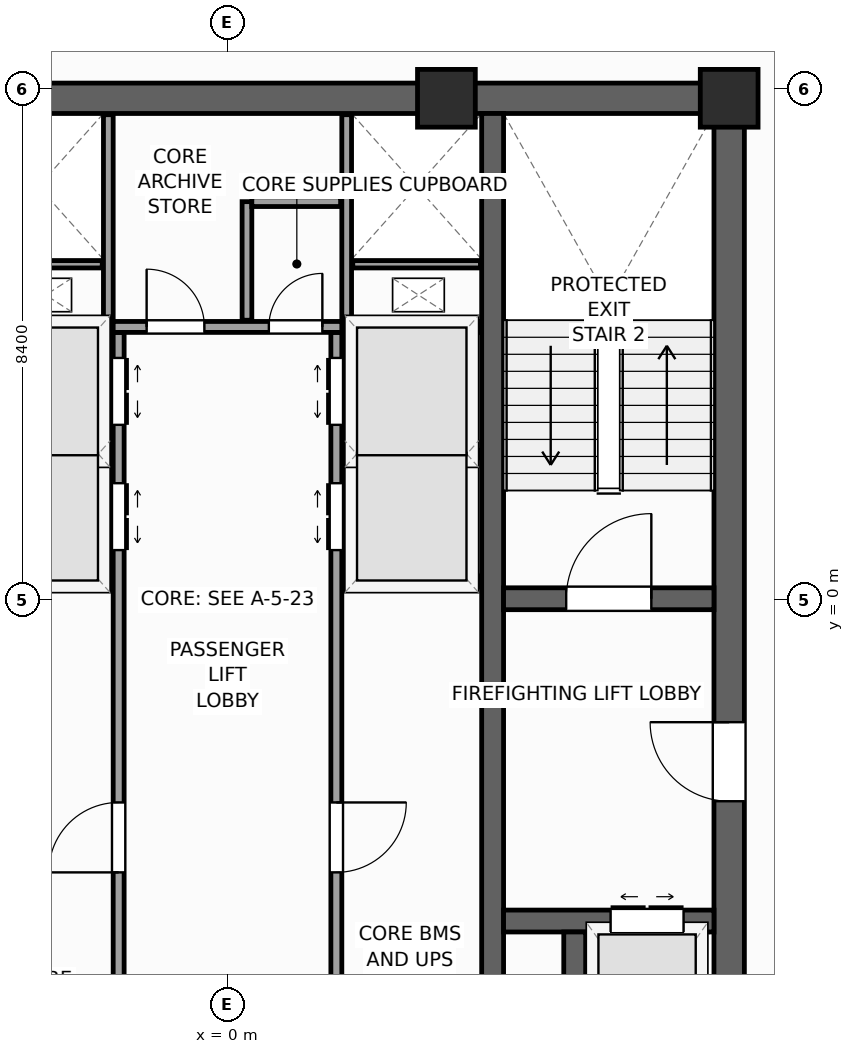
"""IFC4 building model, lengths in metres.
Left out: names, types, materials, properties, quantities, classifications, styles, units other than length and angle.
Written with IfcOpenShell. Run it as: python <this file> out.ifc"""

import sys

from ifc_helpers import new_model, si_unit, direction, frame, frame_2d, origin, origin_2d, place, context, subcontext, project, spatial, rectangle, extrude, source, transform, mapped, element, fill, save


model = new_model("IFC4")
c1 = context("Model", 3, precision=1e-05, world=origin(), true_north=direction((0.0, 1.0)))
c2 = subcontext(c1, "Body", "Model", "MODEL_VIEW")
j1 = project(units=[si_unit("LENGTHUNIT", "METRE"), si_unit("PLANEANGLEUNIT", "RADIAN")], contexts=[c1])
p1 = place(None, origin())
s1 = spatial("IfcSite", under=j1, at=p1, CompositionType="ELEMENT")
p2 = place(p1, origin())
s2 = spatial("IfcBuilding", under=s1, at=p2, CompositionType="ELEMENT")
p3 = place(p2, frame((0.0, 0.0, 248.5)))
s3 = spatial("IfcBuildingStorey", under=s2, at=p3, CompositionType="ELEMENT", Elevation=248.5)
p4 = place(p3, frame((-8.5, 8.25, 0.0), z_axis=(0.0, 0.0, 1.0), x_axis=(1.0, 0.0, 0.0)))
e1 = element("IfcWall", 1, at=p4, inside=s3, PredefinedType="SHEAR", context=c2, shape_type="SweptSolid", body=[
    extrude(rectangle(XDim=17.0, YDim=0.5, at=frame_2d((8.5, 0.0))), origin(), (0.0, 0.0, 1.0), 3.9),
])
p5 = place(p3, frame((8.25, -8.0, 0.0), z_axis=(0.0, 0.0, 1.0), x_axis=(0.0, 1.0, 0.0)))
e2 = element("IfcWall", 2, at=p5, inside=s3, PredefinedType="SHEAR", context=c2, shape_type="SweptSolid", body=[
    extrude(rectangle(XDim=16.0, YDim=0.5, at=frame_2d((8.0, 0.0))), origin(), (0.0, 0.0, 1.0), 3.9),
])
p6 = place(p5, frame((4.69, 0.0, 0.0)))
e3 = element("IfcOpeningElement", 3, at=p6, cuts=e2, PredefinedType="OPENING", context=c2, shape_type="SweptSolid", body=[
    extrude(rectangle(XDim=1.3, YDim=2.2, at=frame_2d((0.65, 1.1))), frame((0.0, 0.26, 0.0), z_axis=(0.0, -1.0, 0.0), x_axis=(1.0, 0.0, 0.0)), (0.0, 0.0, 1.0), 0.52),
])
p7 = place(p3, frame((4.36, -8.0, 0.0), z_axis=(0.0, 0.0, 1.0), x_axis=(0.0, 1.0, 0.0)))
e4 = element("IfcWall", 4, at=p7, inside=s3, PredefinedType="SHEAR", context=c2, shape_type="SweptSolid", body=[
    extrude(rectangle(XDim=16.0, YDim=0.36, at=frame_2d((8.0, 0.0))), origin(), (0.0, 0.0, 1.0), 3.9),
])
p8 = place(p3, frame((4.54, 0.02, 0.0), z_axis=(0.0, 0.0, 1.0), x_axis=(1.0, 0.0, 0.0)))
e5 = element("IfcWall", 5, at=p8, inside=s3, PredefinedType="SHEAR", context=c2, shape_type="SweptSolid", body=[
    extrude(rectangle(XDim=3.46, YDim=0.36, at=frame_2d((1.73, 0.0))), origin(), (0.0, 0.0, 1.0), 3.9),
])
p9 = place(p8, frame((1.03, 0.0, 0.0)))
e6 = element("IfcOpeningElement", 6, at=p9, cuts=e5, PredefinedType="OPENING", context=c2, shape_type="SweptSolid", body=[
    extrude(rectangle(XDim=1.4, YDim=2.2, at=frame_2d((0.7, 1.1))), frame((0.0, 0.19, 0.0), z_axis=(0.0, -1.0, 0.0), x_axis=(1.0, 0.0, 0.0)), (0.0, 0.0, 1.0), 0.38),
])
p10 = place(p3, frame((4.54, -5.28, 0.0), z_axis=(0.0, 0.0, 1.0), x_axis=(1.0, 0.0, 0.0)))
e7 = element("IfcWall", 7, at=p10, inside=s3, PredefinedType="SHEAR", context=c2, shape_type="SweptSolid", body=[
    extrude(rectangle(XDim=3.46, YDim=0.36, at=frame_2d((1.73, 0.0))), origin(), (0.0, 0.0, 1.0), 3.9),
])
p11 = place(p10, frame((1.76, 0.0, 0.0)))
e8 = element("IfcOpeningElement", 8, at=p11, cuts=e7, PredefinedType="OPENING", context=c2, shape_type="SweptSolid", body=[
    extrude(rectangle(XDim=1.2, YDim=2.25, at=frame_2d((0.6, 1.125))), frame((0.0, 0.19, 0.0), z_axis=(0.0, -1.0, 0.0), x_axis=(1.0, 0.0, 0.0)), (0.0, 0.0, 1.0), 0.38),
])
p12 = place(p3, frame((5.71, -8.0, 0.0), z_axis=(0.0, 0.0, 1.0), x_axis=(0.0, 1.0, 0.0)))
e9 = element("IfcWall", 9, at=p12, inside=s3, PredefinedType="SHEAR", context=c2, shape_type="SweptSolid", body=[
    extrude(rectangle(XDim=2.54, YDim=0.36, at=frame_2d((1.27, 0.0))), origin(), (0.0, 0.0, 1.0), 3.9),
])
m1 = source(origin(), c2, "Body", "SweptSolid", [
    extrude(rectangle(XDim=0.95, YDim=0.95, at=origin_2d()), origin(), (0.0, 0.0, 1.0), 3.9),
])
for number, where, z_axis, x_axis in (
    (10, (8.25, 8.25, 0.0), (0.0, 0.0, 1.0), (1.0, 0.0, 0.0)),
    (11, (3.6, 8.25, 0.0), (0.0, 0.0, 1.0), (1.0, 0.0, 0.0)),
):
    element("IfcColumn", number, at=place(p3, frame(where, z_axis=z_axis, x_axis=x_axis)), inside=s3, PredefinedType="PILASTER", context=c2, shape_type="MappedRepresentation", body=[
        mapped(m1, transform((0.0, 0.0, 0.0), scale=1.0)),
    ])
p13 = place(p3, frame((6.733, -29.154, 0.0), z_axis=(0.0, 0.0, 1.0), x_axis=(0.629325378072, 0.77714192302, 0.0)))
e12 = element("IfcWall", 12, at=p13, inside=s3, PredefinedType="STANDARD", context=c2, shape_type="SweptSolid", body=[
    extrude(rectangle(XDim=36.84, YDim=0.34, at=frame_2d((18.42, 0.0))), origin(), (0.0, 0.0, 1.0), 2.96),
])
p14 = place(p13, frame((12.295, 0.0, 0.0)))
e13 = element("IfcOpeningElement", 13, at=p14, cuts=e12, PredefinedType="OPENING", context=c2, shape_type="SweptSolid", body=[
    extrude(rectangle(XDim=1.05, YDim=2.25, at=frame_2d((0.525, 1.125))), frame((0.0, 0.18, 0.0), z_axis=(0.0, -1.0, 0.0), x_axis=(1.0, 0.0, 0.0)), (0.0, 0.0, 1.0), 0.36),
])
p15 = place(p13, frame((3.721, 0.0, 0.48)))
e14 = element("IfcOpeningElement", 14, at=p15, cuts=e12, PredefinedType="OPENING", context=c2, shape_type="SweptSolid", body=[
    extrude(rectangle(XDim=1.4, YDim=2.4, at=frame_2d((0.7, 1.2))), frame((0.0, 0.18, 0.0), z_axis=(0.0, -1.0, 0.0), x_axis=(1.0, 0.0, 0.0)), (0.0, 0.0, 1.0), 0.36),
])
p16 = place(p13, frame((9.059, 0.0, 0.58)))
e15 = element("IfcOpeningElement", 15, at=p16, cuts=e12, PredefinedType="OPENING", context=c2, shape_type="SweptSolid", body=[
    extrude(rectangle(XDim=1.75, YDim=2.3, at=frame_2d((0.875, 1.15))), frame((0.0, 0.18, 0.0), z_axis=(0.0, -1.0, 0.0), x_axis=(1.0, 0.0, 0.0)), (0.0, 0.0, 1.0), 0.36),
])
p17 = place(p13, frame((16.058, 0.0, 0.58)))
e16 = element("IfcOpeningElement", 16, at=p17, cuts=e12, PredefinedType="OPENING", context=c2, shape_type="SweptSolid", body=[
    extrude(rectangle(XDim=1.75, YDim=2.3, at=frame_2d((0.875, 1.15))), frame((0.0, 0.18, 0.0), z_axis=(0.0, -1.0, 0.0), x_axis=(1.0, 0.0, 0.0)), (0.0, 0.0, 1.0), 0.36),
])
p18 = place(p13, frame((24.176, 0.0, 0.58)))
e17 = element("IfcOpeningElement", 17, at=p18, cuts=e12, PredefinedType="OPENING", context=c2, shape_type="SweptSolid", body=[
    extrude(rectangle(XDim=1.75, YDim=2.3, at=frame_2d((0.875, 1.15))), frame((0.0, 0.18, 0.0), z_axis=(0.0, -1.0, 0.0), x_axis=(1.0, 0.0, 0.0)), (0.0, 0.0, 1.0), 0.36),
])
p19 = place(p13, frame((30.982, 0.0, 0.48)))
e18 = element("IfcOpeningElement", 18, at=p19, cuts=e12, PredefinedType="OPENING", context=c2, shape_type="SweptSolid", body=[
    extrude(rectangle(XDim=1.4, YDim=2.4, at=frame_2d((0.7, 1.2))), frame((0.0, 0.18, 0.0), z_axis=(0.0, -1.0, 0.0), x_axis=(1.0, 0.0, 0.0)), (0.0, 0.0, 1.0), 0.36),
])
p20 = place(p3, frame((29.154, 6.733, 0.0), z_axis=(0.0, 0.0, 1.0), x_axis=(-0.77714192302, 0.629325378072, 0.0)))
e19 = element("IfcWall", 19, at=p20, inside=s3, PredefinedType="STANDARD", context=c2, shape_type="SweptSolid", body=[
    extrude(rectangle(XDim=36.84, YDim=0.34, at=frame_2d((18.42, 0.0))), origin(), (0.0, 0.0, 1.0), 2.96),
])
p21 = place(p20, frame((3.721, 0.0, 0.48)))
e20 = element("IfcOpeningElement", 20, at=p21, cuts=e19, PredefinedType="OPENING", context=c2, shape_type="SweptSolid", body=[
    extrude(rectangle(XDim=1.4, YDim=2.4, at=frame_2d((0.7, 1.2))), frame((0.0, 0.18, 0.0), z_axis=(0.0, -1.0, 0.0), x_axis=(1.0, 0.0, 0.0)), (0.0, 0.0, 1.0), 0.36),
])
p22 = place(p20, frame((9.809, 0.0, 0.58)))
e21 = element("IfcOpeningElement", 21, at=p22, cuts=e19, PredefinedType="OPENING", context=c2, shape_type="SweptSolid", body=[
    extrude(rectangle(XDim=1.75, YDim=2.3, at=frame_2d((0.875, 1.15))), frame((0.0, 0.18, 0.0), z_axis=(0.0, -1.0, 0.0), x_axis=(1.0, 0.0, 0.0)), (0.0, 0.0, 1.0), 0.36),
])
p23 = place(p20, frame((16.058, 0.0, 0.58)))
e22 = element("IfcOpeningElement", 22, at=p23, cuts=e19, PredefinedType="OPENING", context=c2, shape_type="SweptSolid", body=[
    extrude(rectangle(XDim=1.75, YDim=2.3, at=frame_2d((0.875, 1.15))), frame((0.0, 0.18, 0.0), z_axis=(0.0, -1.0, 0.0), x_axis=(1.0, 0.0, 0.0)), (0.0, 0.0, 1.0), 0.36),
])
p24 = place(p20, frame((24.176, 0.0, 0.58)))
e23 = element("IfcOpeningElement", 23, at=p24, cuts=e19, PredefinedType="OPENING", context=c2, shape_type="SweptSolid", body=[
    extrude(rectangle(XDim=1.75, YDim=2.3, at=frame_2d((0.875, 1.15))), frame((0.0, 0.18, 0.0), z_axis=(0.0, -1.0, 0.0), x_axis=(1.0, 0.0, 0.0)), (0.0, 0.0, 1.0), 0.36),
])
p25 = place(p20, frame((30.982, 0.0, 0.48)))
e24 = element("IfcOpeningElement", 24, at=p25, cuts=e19, PredefinedType="OPENING", context=c2, shape_type="SweptSolid", body=[
    extrude(rectangle(XDim=1.4, YDim=2.4, at=frame_2d((0.7, 1.2))), frame((0.0, 0.18, 0.0), z_axis=(0.0, -1.0, 0.0), x_axis=(1.0, 0.0, 0.0)), (0.0, 0.0, 1.0), 0.36),
])
p26 = place(p3, frame((-1.79, -7.98, 0.0), z_axis=(0.0, 0.0, 1.0), x_axis=(0.0, 1.0, 0.0)))
e25 = element("IfcWall", 25, at=p26, inside=s3, PredefinedType="PARTITIONING", context=c2, shape_type="SweptSolid", body=[
    extrude(rectangle(XDim=12.38, YDim=0.18, at=frame_2d((6.19, 0.0))), origin(), (0.0, 0.0, 1.0), 3.66),
])
p27 = place(p26, frame((8.8, 0.0, 0.0)))
e26 = element("IfcOpeningElement", 26, at=p27, cuts=e25, PredefinedType="OPENING", context=c2, shape_type="SweptSolid", body=[
    extrude(rectangle(XDim=1.1, YDim=2.2, at=frame_2d((0.55, 1.1))), frame((0.0, 0.1, 0.0), z_axis=(0.0, -1.0, 0.0), x_axis=(1.0, 0.0, 0.0)), (0.0, 0.0, 1.0), 0.2),
])
p28 = place(p26, frame((10.86, 0.0, 0.0)))
e27 = element("IfcOpeningElement", 27, at=p28, cuts=e25, PredefinedType="OPENING", context=c2, shape_type="SweptSolid", body=[
    extrude(rectangle(XDim=1.1, YDim=2.2, at=frame_2d((0.55, 1.1))), frame((0.0, 0.1, 0.0), z_axis=(0.0, -1.0, 0.0), x_axis=(1.0, 0.0, 0.0)), (0.0, 0.0, 1.0), 0.2),
])
p29 = place(p26, frame((3.5, 0.0, 0.0)))
e28 = element("IfcOpeningElement", 28, at=p29, cuts=e25, PredefinedType="OPENING", context=c2, shape_type="SweptSolid", body=[
    extrude(rectangle(XDim=1.15, YDim=2.25, at=frame_2d((0.575, 1.125))), frame((0.0, 0.1, 0.0), z_axis=(0.0, -1.0, 0.0), x_axis=(1.0, 0.0, 0.0)), (0.0, 0.0, 1.0), 0.2),
])
p30 = place(p3, frame((1.79, -7.98, 0.0), z_axis=(0.0, 0.0, 1.0), x_axis=(0.0, 1.0, 0.0)))
e29 = element("IfcWall", 29, at=p30, inside=s3, PredefinedType="PARTITIONING", context=c2, shape_type="SweptSolid", body=[
    extrude(rectangle(XDim=12.38, YDim=0.18, at=frame_2d((6.19, 0.0))), origin(), (0.0, 0.0, 1.0), 3.66),
])
p31 = place(p30, frame((8.8, 0.0, 0.0)))
e30 = element("IfcOpeningElement", 30, at=p31, cuts=e29, PredefinedType="OPENING", context=c2, shape_type="SweptSolid", body=[
    extrude(rectangle(XDim=1.1, YDim=2.2, at=frame_2d((0.55, 1.1))), frame((0.0, 0.1, 0.0), z_axis=(0.0, -1.0, 0.0), x_axis=(1.0, 0.0, 0.0)), (0.0, 0.0, 1.0), 0.2),
])
p32 = place(p30, frame((10.86, 0.0, 0.0)))
e31 = element("IfcOpeningElement", 31, at=p32, cuts=e29, PredefinedType="OPENING", context=c2, shape_type="SweptSolid", body=[
    extrude(rectangle(XDim=1.1, YDim=2.2, at=frame_2d((0.55, 1.1))), frame((0.0, 0.1, 0.0), z_axis=(0.0, -1.0, 0.0), x_axis=(1.0, 0.0, 0.0)), (0.0, 0.0, 1.0), 0.2),
])
p33 = place(p30, frame((3.5, 0.0, 0.0)))
e32 = element("IfcOpeningElement", 32, at=p33, cuts=e29, PredefinedType="OPENING", context=c2, shape_type="SweptSolid", body=[
    extrude(rectangle(XDim=1.15, YDim=2.25, at=frame_2d((0.575, 1.125))), frame((0.0, 0.1, 0.0), z_axis=(0.0, -1.0, 0.0), x_axis=(1.0, 0.0, 0.0)), (0.0, 0.0, 1.0), 0.2),
])
p34 = place(p3, frame((-1.88, 4.49, 0.0), z_axis=(0.0, 0.0, 1.0), x_axis=(1.0, 0.0, 0.0)))
e33 = element("IfcWall", 33, at=p34, inside=s3, PredefinedType="PARTITIONING", context=c2, shape_type="SweptSolid", body=[
    extrude(rectangle(XDim=3.76, YDim=0.18, at=frame_2d((1.88, 0.0))), origin(), (0.0, 0.0, 1.0), 3.66),
])
p35 = place(p34, frame((0.55, 0.0, 0.0)))
e34 = element("IfcOpeningElement", 34, at=p35, cuts=e33, PredefinedType="OPENING", context=c2, shape_type="SweptSolid", body=[
    extrude(rectangle(XDim=0.95, YDim=2.1, at=frame_2d((0.475, 1.05))), frame((0.0, 0.1, 0.0), z_axis=(0.0, -1.0, 0.0), x_axis=(1.0, 0.0, 0.0)), (0.0, 0.0, 1.0), 0.2),
])
p36 = place(p34, frame((2.56, 0.0, 0.0)))
e35 = element("IfcOpeningElement", 35, at=p36, cuts=e33, PredefinedType="OPENING", context=c2, shape_type="SweptSolid", body=[
    extrude(rectangle(XDim=0.88, YDim=2.1, at=frame_2d((0.44, 1.05))), frame((0.0, 0.1, 0.0), z_axis=(0.0, -1.0, 0.0), x_axis=(1.0, 0.0, 0.0)), (0.0, 0.0, 1.0), 0.2),
])
for number, where, z_axis, x_axis in (
    (36, (-4.17, 0.3, 0.0), (0.0, 0.0, 1.0), (1.0, 0.0, 0.0)),
    (37, (1.89, 0.3, 0.0), (0.0, 0.0, 1.0), (1.0, 0.0, 0.0)),
    (38, (-4.17, 4.49, 0.0), (0.0, 0.0, 1.0), (1.0, 0.0, 0.0)),
    (39, (1.89, 4.49, 0.0), (0.0, 0.0, 1.0), (1.0, 0.0, 0.0)),
):
    element("IfcWall", number, at=place(p3, frame(where, z_axis=z_axis, x_axis=x_axis)), inside=s3, PredefinedType="PARTITIONING", context=c2, shape_type="SweptSolid", body=[
        extrude(rectangle(XDim=2.28, YDim=0.18, at=frame_2d((1.14, 0.0))), origin(), (0.0, 0.0, 1.0), 3.66),
    ])
for number, where, z_axis, x_axis in (
    (40, (-4.16, 2.4, 0.0), (0.0, 0.0, 1.0), (1.0, 0.0, 0.0)),
    (41, (1.9, 2.4, 0.0), (0.0, 0.0, 1.0), (1.0, 0.0, 0.0)),
):
    element("IfcWall", number, at=place(p3, frame(where, z_axis=z_axis, x_axis=x_axis)), inside=s3, PredefinedType="PARTITIONING", context=c2, shape_type="SweptSolid", body=[
        extrude(rectangle(XDim=2.26, YDim=0.12, at=frame_2d((1.13, 0.0))), origin(), (0.0, 0.0, 1.0), 3.66),
    ])
for number, where, z_axis, x_axis in (
    (42, (-1.96, 4.58, 0.0), (0.0, 0.0, 1.0), (0.0, 1.0, 0.0)),
    (43, (1.96, 4.58, 0.0), (0.0, 0.0, 1.0), (0.0, 1.0, 0.0)),
):
    element("IfcWall", number, at=place(p3, frame(where, z_axis=z_axis, x_axis=x_axis)), inside=s3, PredefinedType="PARTITIONING", context=c2, shape_type="SweptSolid", body=[
        extrude(rectangle(XDim=3.4, YDim=0.16, at=frame_2d((1.7, 0.0))), origin(), (0.0, 0.0, 1.0), 3.66),
    ])
for number, where, z_axis, x_axis in (
    (44, (-4.16, 5.52, 0.0), (0.0, 0.0, 1.0), (1.0, 0.0, 0.0)),
    (45, (2.06, 5.52, 0.0), (0.0, 0.0, 1.0), (1.0, 0.0, 0.0)),
):
    element("IfcWall", number, at=place(p3, frame(where, z_axis=z_axis, x_axis=x_axis)), inside=s3, PredefinedType="PARTITIONING", context=c2, shape_type="SweptSolid", body=[
        extrude(rectangle(XDim=2.1, YDim=0.12, at=frame_2d((1.05, 0.0))), origin(), (0.0, 0.0, 1.0), 3.66),
    ])
p37 = place(p3, frame((0.32, 4.6, 0.0), z_axis=(0.0, 0.0, 1.0), x_axis=(0.0, 1.0, 0.0)))
e46 = element("IfcWall", 46, at=p37, inside=s3, PredefinedType="PARTITIONING", context=c2, shape_type="SweptSolid", body=[
    extrude(rectangle(XDim=1.95, YDim=0.16, at=frame_2d((0.975, 0.0))), origin(), (0.0, 0.0, 1.0), 3.66),
])
p38 = place(p3, frame((0.4, 6.55, 0.0), z_axis=(0.0, 0.0, 1.0), x_axis=(1.0, 0.0, 0.0)))
e47 = element("IfcWall", 47, at=p38, inside=s3, PredefinedType="PARTITIONING", context=c2, shape_type="SweptSolid", body=[
    extrude(rectangle(XDim=1.46, YDim=0.16, at=frame_2d((0.73, 0.0))), origin(), (0.0, 0.0, 1.0), 3.66),
])
m2 = source(origin(), c2, "Body", "SweptSolid", [
    extrude(rectangle(XDim=1.4, YDim=2.2, at=frame_2d((0.7, 1.1))), frame((0.0, 0.025, 0.0), z_axis=(0.0, -1.0, 0.0), x_axis=(1.0, 0.0, 0.0)), (0.0, 0.0, 1.0), 0.05),
])
p39 = place(p9, origin())
e48 = element("IfcDoor", 48, at=p39, inside=s3, OperationType="SINGLE_SWING_RIGHT", PredefinedType="DOOR", context=c2, shape_type="MappedRepresentation", body=[
    mapped(m2, transform((0.0, 0.0, 0.0), scale=1.0)),
])
fill(e6, e48)
m3 = source(origin(), c2, "Body", "SweptSolid", [
    extrude(rectangle(XDim=1.3, YDim=2.2, at=frame_2d((0.65, 1.1))), frame((0.0, 0.025, 0.0), z_axis=(0.0, -1.0, 0.0), x_axis=(1.0, 0.0, 0.0)), (0.0, 0.0, 1.0), 0.05),
])
p40 = place(p6, origin())
e49 = element("IfcDoor", 49, at=p40, inside=s3, OperationType="SINGLE_SWING_RIGHT", PredefinedType="DOOR", context=c2, shape_type="MappedRepresentation", body=[
    mapped(m3, transform((0.0, 0.0, 0.0), scale=1.0)),
])
fill(e3, e49)
m4 = source(origin(), c2, "Body", "SweptSolid", [
    extrude(rectangle(XDim=1.2, YDim=2.25, at=frame_2d((0.6, 1.125))), frame((0.0, 0.025, 0.0), z_axis=(0.0, -1.0, 0.0), x_axis=(1.0, 0.0, 0.0)), (0.0, 0.0, 1.0), 0.05),
])
p41 = place(p11, origin())
e50 = element("IfcDoor", 50, at=p41, inside=s3, OperationType="DOUBLE_DOOR_SLIDING", PredefinedType="DOOR", context=c2, shape_type="MappedRepresentation", body=[
    mapped(m4, transform((0.0, 0.0, 0.0), scale=1.0)),
])
fill(e8, e50)
m5 = source(origin(), c2, "Body", "SweptSolid", [
    extrude(rectangle(XDim=1.1, YDim=2.2, at=frame_2d((0.55, 1.1))), frame((0.0, 0.025, 0.0), z_axis=(0.0, -1.0, 0.0), x_axis=(1.0, 0.0, 0.0)), (0.0, 0.0, 1.0), 0.05),
])
p42 = place(p27, frame((1.1, 0.0, 0.0), z_axis=(0.0, 0.0, 1.0), x_axis=(-1.0, 0.0, 0.0)))
e51 = element("IfcDoor", 51, at=p42, inside=s3, OperationType="DOUBLE_DOOR_SLIDING", PredefinedType="DOOR", context=c2, shape_type="MappedRepresentation", body=[
    mapped(m5, transform((0.0, 0.0, 0.0), scale=1.0)),
])
fill(e26, e51)
p43 = place(p28, frame((1.1, 0.0, 0.0), z_axis=(0.0, 0.0, 1.0), x_axis=(-1.0, 0.0, 0.0)))
e52 = element("IfcDoor", 52, at=p43, inside=s3, OperationType="DOUBLE_DOOR_SLIDING", PredefinedType="DOOR", context=c2, shape_type="MappedRepresentation", body=[
    mapped(m5, transform((0.0, 0.0, 0.0), scale=1.0)),
])
fill(e27, e52)
p44 = place(p31, origin())
e53 = element("IfcDoor", 53, at=p44, inside=s3, OperationType="DOUBLE_DOOR_SLIDING", PredefinedType="DOOR", context=c2, shape_type="MappedRepresentation", body=[
    mapped(m5, transform((0.0, 0.0, 0.0), scale=1.0)),
])
fill(e30, e53)
p45 = place(p32, origin())
e54 = element("IfcDoor", 54, at=p45, inside=s3, OperationType="DOUBLE_DOOR_SLIDING", PredefinedType="DOOR", context=c2, shape_type="MappedRepresentation", body=[
    mapped(m5, transform((0.0, 0.0, 0.0), scale=1.0)),
])
fill(e31, e54)
m6 = source(origin(), c2, "Body", "SweptSolid", [
    extrude(rectangle(XDim=1.15, YDim=2.25, at=frame_2d((0.575, 1.125))), frame((0.0, 0.025, 0.0), z_axis=(0.0, -1.0, 0.0), x_axis=(1.0, 0.0, 0.0)), (0.0, 0.0, 1.0), 0.05),
])
p46 = place(p29, origin())
e55 = element("IfcDoor", 55, at=p46, inside=s3, OperationType="SINGLE_SWING_LEFT", PredefinedType="DOOR", context=c2, shape_type="MappedRepresentation", body=[
    mapped(m6, transform((0.0, 0.0, 0.0), scale=1.0)),
])
fill(e28, e55)
p47 = place(p33, frame((1.15, 0.0, 0.0), z_axis=(0.0, 0.0, 1.0), x_axis=(-1.0, 0.0, 0.0)))
e56 = element("IfcDoor", 56, at=p47, inside=s3, OperationType="SINGLE_SWING_RIGHT", PredefinedType="DOOR", context=c2, shape_type="MappedRepresentation", body=[
    mapped(m6, transform((0.0, 0.0, 0.0), scale=1.0)),
])
fill(e32, e56)
m7 = source(origin(), c2, "Body", "SweptSolid", [
    extrude(rectangle(XDim=0.95, YDim=2.1, at=frame_2d((0.475, 1.05))), frame((0.0, 0.025, 0.0), z_axis=(0.0, -1.0, 0.0), x_axis=(1.0, 0.0, 0.0)), (0.0, 0.0, 1.0), 0.05),
])
p48 = place(p35, origin())
e57 = element("IfcDoor", 57, at=p48, inside=s3, OperationType="SINGLE_SWING_LEFT", PredefinedType="DOOR", context=c2, shape_type="MappedRepresentation", body=[
    mapped(m7, transform((0.0, 0.0, 0.0), scale=1.0)),
])
fill(e34, e57)
m8 = source(origin(), c2, "Body", "SweptSolid", [
    extrude(rectangle(XDim=0.88, YDim=2.1, at=frame_2d((0.44, 1.05))), frame((0.0, 0.025, 0.0), z_axis=(0.0, -1.0, 0.0), x_axis=(1.0, 0.0, 0.0)), (0.0, 0.0, 1.0), 0.05),
])
p49 = place(p36, origin())
e58 = element("IfcDoor", 58, at=p49, inside=s3, OperationType="SINGLE_SWING_RIGHT", PredefinedType="DOOR", context=c2, shape_type="MappedRepresentation", body=[
    mapped(m8, transform((0.0, 0.0, 0.0), scale=1.0)),
])
fill(e35, e58)
save(model, sys.argv[1])
